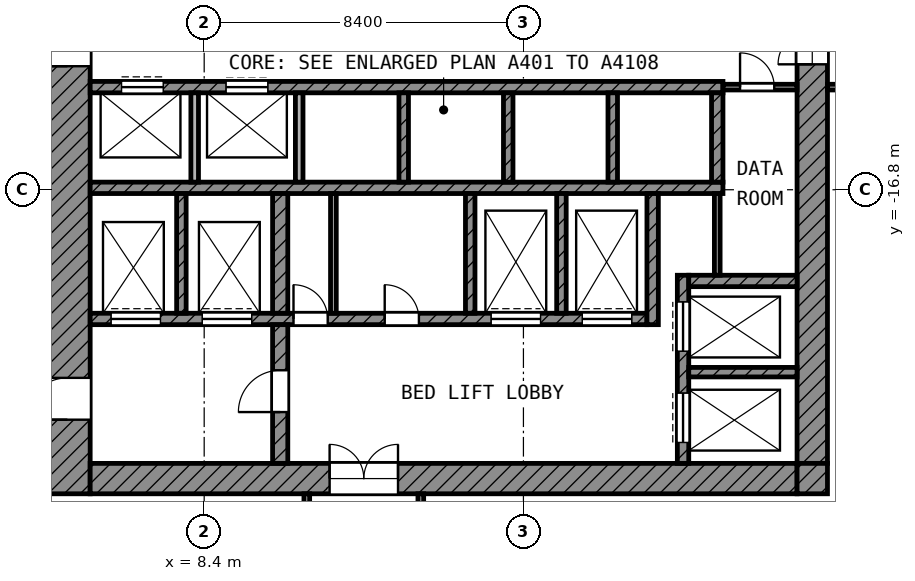
"""IFC4 building model, lengths in metres.
Left out: names, types, materials, properties, quantities, classifications, styles, units other than length and angle.
Written with IfcOpenShell. Run it as: python <this file> out.ifc"""

import sys

from ifc_helpers import new_model, si_unit, direction, frame, frame_2d, origin, place, context, subcontext, project, spatial, rectangle, extrude, element, fill, save


model = new_model("IFC4")
c1 = context("Model", 3, precision=1e-05, world=origin(), true_north=direction((0.0, 1.0)))
c2 = subcontext(c1, "Body", "Model", "MODEL_VIEW")
j1 = project(units=[si_unit("LENGTHUNIT", "METRE"), si_unit("PLANEANGLEUNIT", "RADIAN")], contexts=[c1])
p1 = place(None, origin())
s1 = spatial("IfcSite", under=j1, at=p1, CompositionType="ELEMENT")
p2 = place(p1, origin())
s2 = spatial("IfcBuilding", under=s1, at=p2, CompositionType="ELEMENT")
p3 = place(p2, frame((0.0, 0.0, 234.8)))
s3 = spatial("IfcBuildingStorey", under=s2, at=p3, CompositionType="ELEMENT", Elevation=234.8)
p4 = place(p3, frame((4.8, -24.8, 0.0), z_axis=(0.0, 0.0, 1.0), x_axis=(0.0, 1.0, 0.0)))
e1 = element("IfcWall", 1, at=p4, inside=s3, PredefinedType="SHEAR", context=c2, shape_type="SweptSolid", body=[
    extrude(rectangle(XDim=19.4, YDim=1.2, at=frame_2d((9.7, 0.0))), origin(), (0.0, 0.0, 1.0), 3.6),
])
p5 = place(p4, frame((11.25, 0.0, 0.0)))
e2 = element("IfcOpeningElement", 2, at=p5, cuts=e1, PredefinedType="OPENING", context=c2, shape_type="SweptSolid", body=[
    extrude(rectangle(XDim=1.1, YDim=2.1, at=frame_2d((0.55, 1.05))), frame((0.0, 0.61, 0.0), z_axis=(0.0, -1.0, 0.0), x_axis=(1.0, 0.0, 0.0)), (0.0, 0.0, 1.0), 1.22),
])
p6 = place(p4, frame((1.95, 0.0, 0.0)))
e3 = element("IfcOpeningElement", 3, at=p6, cuts=e1, PredefinedType="OPENING", context=c2, shape_type="SweptSolid", body=[
    extrude(rectangle(XDim=1.1, YDim=2.1, at=frame_2d((0.55, 1.05))), frame((0.0, 0.61, 0.0), z_axis=(0.0, -1.0, 0.0), x_axis=(1.0, 0.0, 0.0)), (0.0, 0.0, 1.0), 1.22),
])
p7 = place(p3, frame((24.4, -24.0, 0.0), z_axis=(0.0, 0.0, 1.0), x_axis=(0.0, 1.0, 0.0)))
e4 = element("IfcWall", 4, at=p7, inside=s3, PredefinedType="SHEAR", context=c2, shape_type="SweptSolid", body=[
    extrude(rectangle(XDim=18.6, YDim=0.8, at=frame_2d((9.3, 0.0))), origin(), (0.0, 0.0, 1.0), 3.6),
])
p8 = place(p7, frame((10.5, 0.0, 0.0)))
e5 = element("IfcOpeningElement", 5, at=p8, cuts=e4, PredefinedType="OPENING", context=c2, shape_type="SweptSolid", body=[
    extrude(rectangle(XDim=1.8, YDim=2.1, at=frame_2d((0.9, 1.05))), frame((0.0, 0.41, 0.0), z_axis=(0.0, -1.0, 0.0), x_axis=(1.0, 0.0, 0.0)), (0.0, 0.0, 1.0), 0.82),
])
p9 = place(p3, frame((5.4, -24.4, 0.0), z_axis=(0.0, 0.0, 1.0), x_axis=(1.0, 0.0, 0.0)))
e6 = element("IfcWall", 6, at=p9, inside=s3, PredefinedType="SHEAR", context=c2, shape_type="SweptSolid", body=[
    extrude(rectangle(XDim=18.6, YDim=0.8, at=frame_2d((9.3, 0.0))), origin(), (0.0, 0.0, 1.0), 3.6),
])
p10 = place(p9, frame((6.3, 0.0, 0.0)))
e7 = element("IfcOpeningElement", 7, at=p10, cuts=e6, PredefinedType="OPENING", context=c2, shape_type="SweptSolid", body=[
    extrude(rectangle(XDim=1.8, YDim=2.1, at=frame_2d((0.9, 1.05))), frame((0.0, 0.41, 0.0), z_axis=(0.0, -1.0, 0.0), x_axis=(1.0, 0.0, 0.0)), (0.0, 0.0, 1.0), 0.82),
])
p11 = place(p3, frame((24.4, -24.8, 0.0), z_axis=(0.0, 0.0, 1.0), x_axis=(0.0, 1.0, 0.0)))
e8 = element("IfcWall", 8, at=p11, inside=s3, PredefinedType="SHEAR", context=c2, shape_type="SweptSolid", body=[
    extrude(rectangle(XDim=0.8, YDim=0.8, at=frame_2d((0.4, 0.0))), origin(), (0.0, 0.0, 1.0), 3.6),
])
p12 = place(p3, frame((5.4, -14.1, 0.0), z_axis=(0.0, 0.0, 1.0), x_axis=(1.0, 0.0, 0.0)))
e9 = element("IfcWall", 9, at=p12, inside=s3, PredefinedType="SHEAR", context=c2, shape_type="SweptSolid", body=[
    extrude(rectangle(XDim=16.65, YDim=0.3, at=frame_2d((8.325, 0.0))), origin(), (0.0, 0.0, 1.0), 3.6),
])
p13 = place(p12, frame((0.825, 0.0, 0.0)))
e10 = element("IfcOpeningElement", 10, at=p13, cuts=e9, PredefinedType="OPENING", context=c2, shape_type="SweptSolid", body=[
    extrude(rectangle(XDim=1.1, YDim=2.1, at=frame_2d((0.55, 1.05))), frame((0.0, 0.16, 0.0), z_axis=(0.0, -1.0, 0.0), x_axis=(1.0, 0.0, 0.0)), (0.0, 0.0, 1.0), 0.32),
])
p14 = place(p12, frame((3.575, 0.0, 0.0)))
e11 = element("IfcOpeningElement", 11, at=p14, cuts=e9, PredefinedType="OPENING", context=c2, shape_type="SweptSolid", body=[
    extrude(rectangle(XDim=1.1, YDim=2.1, at=frame_2d((0.55, 1.05))), frame((0.0, 0.16, 0.0), z_axis=(0.0, -1.0, 0.0), x_axis=(1.0, 0.0, 0.0)), (0.0, 0.0, 1.0), 0.32),
])
p15 = place(p3, frame((5.4, -16.75, 0.0), z_axis=(0.0, 0.0, 1.0), x_axis=(1.0, 0.0, 0.0)))
e12 = element("IfcWall", 12, at=p15, inside=s3, PredefinedType="SHEAR", context=c2, shape_type="SweptSolid", body=[
    extrude(rectangle(XDim=16.65, YDim=0.3, at=frame_2d((8.325, 0.0))), origin(), (0.0, 0.0, 1.0), 3.6),
])
p16 = place(p3, frame((5.4, -20.2, 0.0), z_axis=(0.0, 0.0, 1.0), x_axis=(1.0, 0.0, 0.0)))
e13 = element("IfcWall", 13, at=p16, inside=s3, PredefinedType="SHEAR", context=c2, shape_type="SweptSolid", body=[
    extrude(rectangle(XDim=14.65, YDim=0.3, at=frame_2d((7.325, 0.0))), origin(), (0.0, 0.0, 1.0), 3.6),
])
p17 = place(p16, frame((10.55, 0.0, 0.0)))
e14 = element("IfcOpeningElement", 14, at=p17, cuts=e13, PredefinedType="OPENING", context=c2, shape_type="SweptSolid", body=[
    extrude(rectangle(XDim=1.3, YDim=2.1, at=frame_2d((0.65, 1.05))), frame((0.0, 0.16, 0.0), z_axis=(0.0, -1.0, 0.0), x_axis=(1.0, 0.0, 0.0)), (0.0, 0.0, 1.0), 0.32),
])
p18 = place(p16, frame((12.95, 0.0, 0.0)))
e15 = element("IfcOpeningElement", 15, at=p18, cuts=e13, PredefinedType="OPENING", context=c2, shape_type="SweptSolid", body=[
    extrude(rectangle(XDim=1.3, YDim=2.1, at=frame_2d((0.65, 1.05))), frame((0.0, 0.16, 0.0), z_axis=(0.0, -1.0, 0.0), x_axis=(1.0, 0.0, 0.0)), (0.0, 0.0, 1.0), 0.32),
])
p19 = place(p16, frame((0.55, 0.0, 0.0)))
e16 = element("IfcOpeningElement", 16, at=p19, cuts=e13, PredefinedType="OPENING", context=c2, shape_type="SweptSolid", body=[
    extrude(rectangle(XDim=1.3, YDim=2.1, at=frame_2d((0.65, 1.05))), frame((0.0, 0.16, 0.0), z_axis=(0.0, -1.0, 0.0), x_axis=(1.0, 0.0, 0.0)), (0.0, 0.0, 1.0), 0.32),
])
p20 = place(p16, frame((2.95, 0.0, 0.0)))
e17 = element("IfcOpeningElement", 17, at=p20, cuts=e13, PredefinedType="OPENING", context=c2, shape_type="SweptSolid", body=[
    extrude(rectangle(XDim=1.3, YDim=2.1, at=frame_2d((0.65, 1.05))), frame((0.0, 0.16, 0.0), z_axis=(0.0, -1.0, 0.0), x_axis=(1.0, 0.0, 0.0)), (0.0, 0.0, 1.0), 0.32),
])
p21 = place(p16, frame((5.35, 0.0, 0.0)))
e18 = element("IfcOpeningElement", 18, at=p21, cuts=e13, PredefinedType="OPENING", context=c2, shape_type="SweptSolid", body=[
    extrude(rectangle(XDim=0.9, YDim=2.1, at=frame_2d((0.45, 1.05))), frame((0.0, 0.16, 0.0), z_axis=(0.0, -1.0, 0.0), x_axis=(1.0, 0.0, 0.0)), (0.0, 0.0, 1.0), 0.32),
])
p22 = place(p16, frame((7.75, 0.0, 0.0)))
e19 = element("IfcOpeningElement", 19, at=p22, cuts=e13, PredefinedType="OPENING", context=c2, shape_type="SweptSolid", body=[
    extrude(rectangle(XDim=0.9, YDim=2.1, at=frame_2d((0.45, 1.05))), frame((0.0, 0.16, 0.0), z_axis=(0.0, -1.0, 0.0), x_axis=(1.0, 0.0, 0.0)), (0.0, 0.0, 1.0), 0.32),
])
p23 = place(p3, frame((10.4, -24.0, 0.0), z_axis=(0.0, 0.0, 1.0), x_axis=(0.0, 1.0, 0.0)))
e20 = element("IfcWall", 20, at=p23, inside=s3, PredefinedType="SHEAR", context=c2, shape_type="SweptSolid", body=[
    extrude(rectangle(XDim=3.65, YDim=0.4, at=frame_2d((1.825, 0.0))), origin(), (0.0, 0.0, 1.0), 3.6),
])
p24 = place(p23, frame((1.35, 0.0, 0.0)))
e21 = element("IfcOpeningElement", 21, at=p24, cuts=e20, PredefinedType="OPENING", context=c2, shape_type="SweptSolid", body=[
    extrude(rectangle(XDim=1.1, YDim=2.1, at=frame_2d((0.55, 1.05))), frame((0.0, 0.21, 0.0), z_axis=(0.0, -1.0, 0.0), x_axis=(1.0, 0.0, 0.0)), (0.0, 0.0, 1.0), 0.42),
])
p25 = place(p3, frame((10.4, -20.05, 0.0), z_axis=(0.0, 0.0, 1.0), x_axis=(0.0, 1.0, 0.0)))
e22 = element("IfcWall", 22, at=p25, inside=s3, PredefinedType="SHEAR", context=c2, shape_type="SweptSolid", body=[
    extrude(rectangle(XDim=3.15, YDim=0.4, at=frame_2d((1.575, 0.0))), origin(), (0.0, 0.0, 1.0), 3.6),
])
p26 = place(p3, frame((20.2, -20.35, 0.0), z_axis=(0.0, 0.0, 1.0), x_axis=(0.0, 1.0, 0.0)))
e23 = element("IfcWall", 23, at=p26, inside=s3, PredefinedType="SHEAR", context=c2, shape_type="SweptSolid", body=[
    extrude(rectangle(XDim=3.45, YDim=0.3, at=frame_2d((1.725, 0.0))), origin(), (0.0, 0.0, 1.0), 3.6),
])
p27 = place(p3, frame((21.9, -16.6, 0.0), z_axis=(0.0, 0.0, 1.0), x_axis=(0.0, 1.0, 0.0)))
e24 = element("IfcWall", 24, at=p27, inside=s3, PredefinedType="SHEAR", context=c2, shape_type="SweptSolid", body=[
    extrude(rectangle(XDim=2.35, YDim=0.3, at=frame_2d((1.175, 0.0))), origin(), (0.0, 0.0, 1.0), 3.6),
])
p28 = place(p3, frame((21.15, -19.2, 0.0), z_axis=(0.0, 0.0, 1.0), x_axis=(1.0, 0.0, 0.0)))
e25 = element("IfcWall", 25, at=p28, inside=s3, PredefinedType="SHEAR", context=c2, shape_type="SweptSolid", body=[
    extrude(rectangle(XDim=2.85, YDim=0.3, at=frame_2d((1.425, 0.0))), origin(), (0.0, 0.0, 1.0), 3.6),
])
p29 = place(p3, frame((21.0, -24.0, 0.0), z_axis=(0.0, 0.0, 1.0), x_axis=(0.0, 1.0, 0.0)))
e26 = element("IfcWall", 26, at=p29, inside=s3, PredefinedType="SHEAR", context=c2, shape_type="SweptSolid", body=[
    extrude(rectangle(XDim=4.95, YDim=0.3, at=frame_2d((2.475, 0.0))), origin(), (0.0, 0.0, 1.0), 3.6),
])
p30 = place(p29, frame((2.95, 0.0, 0.0)))
e27 = element("IfcOpeningElement", 27, at=p30, cuts=e26, PredefinedType="OPENING", context=c2, shape_type="SweptSolid", body=[
    extrude(rectangle(XDim=1.3, YDim=2.1, at=frame_2d((0.65, 1.05))), frame((0.0, 0.16, 0.0), z_axis=(0.0, -1.0, 0.0), x_axis=(1.0, 0.0, 0.0)), (0.0, 0.0, 1.0), 0.32),
])
p31 = place(p29, frame((0.55, 0.0, 0.0)))
e28 = element("IfcOpeningElement", 28, at=p31, cuts=e26, PredefinedType="OPENING", context=c2, shape_type="SweptSolid", body=[
    extrude(rectangle(XDim=1.3, YDim=2.1, at=frame_2d((0.65, 1.05))), frame((0.0, 0.16, 0.0), z_axis=(0.0, -1.0, 0.0), x_axis=(1.0, 0.0, 0.0)), (0.0, 0.0, 1.0), 0.32),
])
p32 = place(p3, frame((21.15, -21.6, 0.0), z_axis=(0.0, 0.0, 1.0), x_axis=(1.0, 0.0, 0.0)))
e29 = element("IfcWall", 29, at=p32, inside=s3, PredefinedType="SHEAR", context=c2, shape_type="SweptSolid", body=[
    extrude(rectangle(XDim=2.85, YDim=0.25, at=frame_2d((1.425, 0.0))), origin(), (0.0, 0.0, 1.0), 3.6),
])
for number, where, z_axis, x_axis in (
    (30, (7.8, -20.05, 0.0), (0.0, 0.0, 1.0), (0.0, 1.0, 0.0)),
    (31, (15.4, -20.05, 0.0), (0.0, 0.0, 1.0), (0.0, 1.0, 0.0)),
    (32, (17.8, -20.05, 0.0), (0.0, 0.0, 1.0), (0.0, 1.0, 0.0)),
):
    element("IfcWall", number, at=place(p3, frame(where, z_axis=z_axis, x_axis=x_axis)), inside=s3, PredefinedType="SHEAR", context=c2, shape_type="SweptSolid", body=[
        extrude(rectangle(XDim=3.15, YDim=0.25, at=frame_2d((1.575, 0.0))), origin(), (0.0, 0.0, 1.0), 3.6),
    ])
for number, where, z_axis, x_axis in (
    (33, (8.15, -16.6, 0.0), (0.0, 0.0, 1.0), (0.0, 1.0, 0.0)),
    (34, (10.9, -16.6, 0.0), (0.0, 0.0, 1.0), (0.0, 1.0, 0.0)),
):
    element("IfcWall", number, at=place(p3, frame(where, z_axis=z_axis, x_axis=x_axis)), inside=s3, PredefinedType="PARTITIONING", context=c2, shape_type="SweptSolid", body=[
        extrude(rectangle(XDim=2.35, YDim=0.2, at=frame_2d((1.175, 0.0))), origin(), (0.0, 0.0, 1.0), 3.6),
    ])
for number, where, z_axis, x_axis in (
    (35, (13.65, -16.6, 0.0), (0.0, 0.0, 1.0), (0.0, 1.0, 0.0)),
    (36, (16.4, -16.6, 0.0), (0.0, 0.0, 1.0), (0.0, 1.0, 0.0)),
    (37, (19.15, -16.6, 0.0), (0.0, 0.0, 1.0), (0.0, 1.0, 0.0)),
):
    element("IfcWall", number, at=place(p3, frame(where, z_axis=z_axis, x_axis=x_axis)), inside=s3, PredefinedType="SHEAR", context=c2, shape_type="SweptSolid", body=[
        extrude(rectangle(XDim=2.35, YDim=0.25, at=frame_2d((1.175, 0.0))), origin(), (0.0, 0.0, 1.0), 3.6),
    ])
p33 = place(p3, frame((21.9, -19.05, 0.0), z_axis=(0.0, 0.0, 1.0), x_axis=(0.0, 1.0, 0.0)))
e38 = element("IfcWall", 38, at=p33, inside=s3, PredefinedType="PARTITIONING", context=c2, shape_type="SweptSolid", body=[
    extrude(rectangle(XDim=2.15, YDim=0.15, at=frame_2d((1.075, 0.0))), origin(), (0.0, 0.0, 1.0), 3.6),
])
p34 = place(p3, frame((22.05, -14.1, 0.0), z_axis=(0.0, 0.0, 1.0), x_axis=(1.0, 0.0, 0.0)))
e39 = element("IfcWall", 39, at=p34, inside=s3, PredefinedType="PARTITIONING", context=c2, shape_type="SweptSolid", body=[
    extrude(rectangle(XDim=1.95, YDim=0.15, at=frame_2d((0.975, 0.0))), origin(), (0.0, 0.0, 1.0), 3.6),
])
p35 = place(p34, frame((0.45, 0.0, 0.0)))
e40 = element("IfcOpeningElement", 40, at=p35, cuts=e39, PredefinedType="OPENING", context=c2, shape_type="SweptSolid", body=[
    extrude(rectangle(XDim=0.9, YDim=2.1, at=frame_2d((0.45, 1.05))), frame((0.0, 0.085, 0.0), z_axis=(0.0, -1.0, 0.0), x_axis=(1.0, 0.0, 0.0)), (0.0, 0.0, 1.0), 0.17),
])
p36 = place(p3, frame((11.8, -20.05, 0.0), z_axis=(0.0, 0.0, 1.0), x_axis=(0.0, 1.0, 0.0)))
e41 = element("IfcWall", 41, at=p36, inside=s3, PredefinedType="PARTITIONING", context=c2, shape_type="SweptSolid", body=[
    extrude(rectangle(XDim=3.15, YDim=0.15, at=frame_2d((1.575, 0.0))), origin(), (0.0, 0.0, 1.0), 3.6),
])
p37 = place(p3, frame((24.8, -14.1, 0.0), z_axis=(0.0, 0.0, 1.0), x_axis=(1.0, 0.0, 0.0)))
e42 = element("IfcWall", 42, at=p37, inside=s3, PredefinedType="PARTITIONING", context=c2, shape_type="SweptSolid", body=[
    extrude(rectangle(XDim=4.525, YDim=0.15, at=frame_2d((2.262, 0.0))), origin(), (0.0, 0.0, 1.0), 3.6),
])
p38 = place(p37, frame((1.75, 0.0, 0.0)))
e43 = element("IfcOpeningElement", 43, at=p38, cuts=e42, PredefinedType="OPENING", context=c2, shape_type="SweptSolid", body=[
    extrude(rectangle(XDim=1.5, YDim=2.1, at=frame_2d((0.75, 1.05))), frame((0.0, 0.085, 0.0), z_axis=(0.0, -1.0, 0.0), x_axis=(1.0, 0.0, 0.0)), (0.0, 0.0, 1.0), 0.17),
])
p39 = place(p3, frame((11.1, -29.4, 0.0), z_axis=(0.0, 0.0, 1.0), x_axis=(0.0, 1.0, 0.0)))
e44 = element("IfcWall", 44, at=p39, inside=s3, PredefinedType="PARTITIONING", context=c2, shape_type="SweptSolid", body=[
    extrude(rectangle(XDim=4.6, YDim=0.15, at=frame_2d((2.3, 0.0))), origin(), (0.0, 0.0, 1.0), 3.6),
])
p40 = place(p39, frame((1.6, 0.0, 0.0)))
e45 = element("IfcOpeningElement", 45, at=p40, cuts=e44, PredefinedType="OPENING", context=c2, shape_type="SweptSolid", body=[
    extrude(rectangle(XDim=1.0, YDim=2.1, at=frame_2d((0.5, 1.05))), frame((0.0, 0.085, 0.0), z_axis=(0.0, -1.0, 0.0), x_axis=(1.0, 0.0, 0.0)), (0.0, 0.0, 1.0), 0.17),
])
p41 = place(p3, frame((14.1, -29.4, 0.0), z_axis=(0.0, 0.0, 1.0), x_axis=(0.0, 1.0, 0.0)))
e46 = element("IfcWall", 46, at=p41, inside=s3, PredefinedType="PARTITIONING", context=c2, shape_type="SweptSolid", body=[
    extrude(rectangle(XDim=4.6, YDim=0.15, at=frame_2d((2.3, 0.0))), origin(), (0.0, 0.0, 1.0), 3.6),
])
p42 = place(p13, origin())
e47 = element("IfcDoor", 47, at=p42, inside=s3, OperationType="DOUBLE_DOOR_SLIDING", PredefinedType="DOOR", context=c2, shape_type="SweptSolid", body=[
    extrude(rectangle(XDim=1.1, YDim=2.1, at=frame_2d((0.55, 1.05))), frame((0.0, 0.025, 0.0), z_axis=(0.0, -1.0, 0.0), x_axis=(1.0, 0.0, 0.0)), (0.0, 0.0, 1.0), 0.05),
])
fill(e10, e47)
p43 = place(p14, origin())
e48 = element("IfcDoor", 48, at=p43, inside=s3, OperationType="DOUBLE_DOOR_SLIDING", PredefinedType="DOOR", context=c2, shape_type="SweptSolid", body=[
    extrude(rectangle(XDim=1.1, YDim=2.1, at=frame_2d((0.55, 1.05))), frame((0.0, 0.025, 0.0), z_axis=(0.0, -1.0, 0.0), x_axis=(1.0, 0.0, 0.0)), (0.0, 0.0, 1.0), 0.05),
])
fill(e11, e48)
p44 = place(p30, origin())
e49 = element("IfcDoor", 49, at=p44, inside=s3, OperationType="DOUBLE_DOOR_SLIDING", PredefinedType="DOOR", context=c2, shape_type="SweptSolid", body=[
    extrude(rectangle(XDim=1.3, YDim=2.1, at=frame_2d((0.65, 1.05))), frame((0.0, 0.025, 0.0), z_axis=(0.0, -1.0, 0.0), x_axis=(1.0, 0.0, 0.0)), (0.0, 0.0, 1.0), 0.05),
])
fill(e27, e49)
p45 = place(p31, origin())
e50 = element("IfcDoor", 50, at=p45, inside=s3, OperationType="DOUBLE_DOOR_SLIDING", PredefinedType="DOOR", context=c2, shape_type="SweptSolid", body=[
    extrude(rectangle(XDim=1.3, YDim=2.1, at=frame_2d((0.65, 1.05))), frame((0.0, 0.025, 0.0), z_axis=(0.0, -1.0, 0.0), x_axis=(1.0, 0.0, 0.0)), (0.0, 0.0, 1.0), 0.05),
])
fill(e28, e50)
p46 = place(p17, origin())
e51 = element("IfcDoor", 51, at=p46, inside=s3, OperationType="DOUBLE_DOOR_SLIDING", PredefinedType="DOOR", context=c2, shape_type="SweptSolid", body=[
    extrude(rectangle(XDim=1.3, YDim=2.1, at=frame_2d((0.65, 1.05))), frame((0.0, 0.025, 0.0), z_axis=(0.0, -1.0, 0.0), x_axis=(1.0, 0.0, 0.0)), (0.0, 0.0, 1.0), 0.05),
])
fill(e14, e51)
p47 = place(p18, origin())
e52 = element("IfcDoor", 52, at=p47, inside=s3, OperationType="DOUBLE_DOOR_SLIDING", PredefinedType="DOOR", context=c2, shape_type="SweptSolid", body=[
    extrude(rectangle(XDim=1.3, YDim=2.1, at=frame_2d((0.65, 1.05))), frame((0.0, 0.025, 0.0), z_axis=(0.0, -1.0, 0.0), x_axis=(1.0, 0.0, 0.0)), (0.0, 0.0, 1.0), 0.05),
])
fill(e15, e52)
p48 = place(p19, origin())
e53 = element("IfcDoor", 53, at=p48, inside=s3, OperationType="DOUBLE_DOOR_SLIDING", PredefinedType="DOOR", context=c2, shape_type="SweptSolid", body=[
    extrude(rectangle(XDim=1.3, YDim=2.1, at=frame_2d((0.65, 1.05))), frame((0.0, 0.025, 0.0), z_axis=(0.0, -1.0, 0.0), x_axis=(1.0, 0.0, 0.0)), (0.0, 0.0, 1.0), 0.05),
])
fill(e16, e53)
p49 = place(p20, origin())
e54 = element("IfcDoor", 54, at=p49, inside=s3, OperationType="DOUBLE_DOOR_SLIDING", PredefinedType="DOOR", context=c2, shape_type="SweptSolid", body=[
    extrude(rectangle(XDim=1.3, YDim=2.1, at=frame_2d((0.65, 1.05))), frame((0.0, 0.025, 0.0), z_axis=(0.0, -1.0, 0.0), x_axis=(1.0, 0.0, 0.0)), (0.0, 0.0, 1.0), 0.05),
])
fill(e17, e54)
p50 = place(p5, origin())
e55 = element("IfcDoor", 55, at=p50, inside=s3, OperationType="SINGLE_SWING_LEFT", PredefinedType="DOOR", context=c2, shape_type="SweptSolid", body=[
    extrude(rectangle(XDim=1.1, YDim=2.1, at=frame_2d((0.55, 1.05))), frame((0.0, 0.025, 0.0), z_axis=(0.0, -1.0, 0.0), x_axis=(1.0, 0.0, 0.0)), (0.0, 0.0, 1.0), 0.05),
])
fill(e2, e55)
p51 = place(p6, origin())
e56 = element("IfcDoor", 56, at=p51, inside=s3, OperationType="SINGLE_SWING_LEFT", PredefinedType="DOOR", context=c2, shape_type="SweptSolid", body=[
    extrude(rectangle(XDim=1.1, YDim=2.1, at=frame_2d((0.55, 1.05))), frame((0.0, 0.025, 0.0), z_axis=(0.0, -1.0, 0.0), x_axis=(1.0, 0.0, 0.0)), (0.0, 0.0, 1.0), 0.05),
])
fill(e3, e56)
p52 = place(p24, origin())
e57 = element("IfcDoor", 57, at=p52, inside=s3, OperationType="SINGLE_SWING_LEFT", PredefinedType="DOOR", context=c2, shape_type="SweptSolid", body=[
    extrude(rectangle(XDim=1.1, YDim=2.1, at=frame_2d((0.55, 1.05))), frame((0.0, 0.025, 0.0), z_axis=(0.0, -1.0, 0.0), x_axis=(1.0, 0.0, 0.0)), (0.0, 0.0, 1.0), 0.05),
])
fill(e21, e57)
p53 = place(p8, origin())
e58 = element("IfcDoor", 58, at=p53, inside=s3, OperationType="DOUBLE_DOOR_SINGLE_SWING", PredefinedType="DOOR", context=c2, shape_type="SweptSolid", body=[
    extrude(rectangle(XDim=1.8, YDim=2.1, at=frame_2d((0.9, 1.05))), frame((0.0, 0.025, 0.0), z_axis=(0.0, -1.0, 0.0), x_axis=(1.0, 0.0, 0.0)), (0.0, 0.0, 1.0), 0.05),
])
fill(e5, e58)
p54 = place(p10, origin())
e59 = element("IfcDoor", 59, at=p54, inside=s3, OperationType="DOUBLE_DOOR_SINGLE_SWING", PredefinedType="DOOR", context=c2, shape_type="SweptSolid", body=[
    extrude(rectangle(XDim=1.8, YDim=2.1, at=frame_2d((0.9, 1.05))), frame((0.0, 0.025, 0.0), z_axis=(0.0, -1.0, 0.0), x_axis=(1.0, 0.0, 0.0)), (0.0, 0.0, 1.0), 0.05),
])
fill(e7, e59)
p55 = place(p35, origin())
e60 = element("IfcDoor", 60, at=p55, inside=s3, OperationType="SINGLE_SWING_LEFT", PredefinedType="DOOR", context=c2, shape_type="SweptSolid", body=[
    extrude(rectangle(XDim=0.9, YDim=2.1, at=frame_2d((0.45, 1.05))), frame((0.0, 0.025, 0.0), z_axis=(0.0, -1.0, 0.0), x_axis=(1.0, 0.0, 0.0)), (0.0, 0.0, 1.0), 0.05),
])
fill(e40, e60)
p56 = place(p21, origin())
e61 = element("IfcDoor", 61, at=p56, inside=s3, OperationType="SINGLE_SWING_LEFT", PredefinedType="DOOR", context=c2, shape_type="SweptSolid", body=[
    extrude(rectangle(XDim=0.9, YDim=2.1, at=frame_2d((0.45, 1.05))), frame((0.0, 0.025, 0.0), z_axis=(0.0, -1.0, 0.0), x_axis=(1.0, 0.0, 0.0)), (0.0, 0.0, 1.0), 0.05),
])
fill(e18, e61)
p57 = place(p22, origin())
e62 = element("IfcDoor", 62, at=p57, inside=s3, OperationType="SINGLE_SWING_LEFT", PredefinedType="DOOR", context=c2, shape_type="SweptSolid", body=[
    extrude(rectangle(XDim=0.9, YDim=2.1, at=frame_2d((0.45, 1.05))), frame((0.0, 0.025, 0.0), z_axis=(0.0, -1.0, 0.0), x_axis=(1.0, 0.0, 0.0)), (0.0, 0.0, 1.0), 0.05),
])
fill(e19, e62)
save(model, sys.argv[1])
